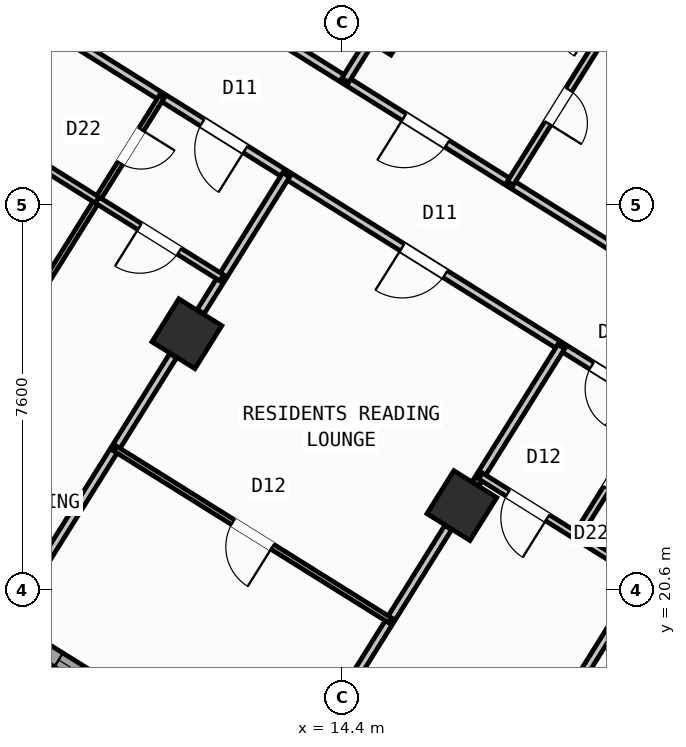
"""IFC4 building model, lengths in metres.
Left out: names, types, materials, properties, quantities, classifications, styles, units other than length and angle.
Written with IfcOpenShell. Run it as: python <this file> out.ifc"""

import sys

from ifc_helpers import new_model, si_unit, direction, frame, frame_2d, origin, origin_2d, place, context, subcontext, project, spatial, rectangle, hollow_rectangle, extrude, source, transform, mapped, element, fill, save


model = new_model("IFC4")
c1 = context("Model", 3, precision=1e-05, world=origin(), true_north=direction((0.0, 1.0)))
c2 = subcontext(c1, "Body", "Model", "MODEL_VIEW")
j1 = project(units=[si_unit("LENGTHUNIT", "METRE"), si_unit("PLANEANGLEUNIT", "RADIAN")], contexts=[c1])
p1 = place(None, origin())
s1 = spatial("IfcSite", under=j1, at=p1, CompositionType="ELEMENT")
p2 = place(p1, origin())
s2 = spatial("IfcBuilding", under=s1, at=p2, CompositionType="ELEMENT")
p3 = place(p2, frame((0.0, 0.0, 49.2)))
s3 = spatial("IfcBuildingStorey", under=s2, at=p3, CompositionType="ELEMENT", Elevation=49.2)
m1 = source(origin(), c2, "Body", "SweptSolid", [
    extrude(hollow_rectangle(XDim=1.0, YDim=1.0, WallThickness=0.04, at=origin_2d()), origin(), (0.0, 0.0, 1.0), 3.6),
])
for number, where, z_axis, x_axis in (
    (1, (16.764, 22.261, 0.0), (0.0, 0.0, 1.0), (-0.848, 0.53, 0.0)),
    (2, (15.205, 31.844, 0.0), (0.0, 0.0, 1.0), (-0.848, 0.53, 0.0)),
    (3, (11.336, 25.653, 0.0), (0.0, 0.0, 1.0), (-0.848, 0.53, 0.0)),
):
    element("IfcColumn", number, at=place(p3, frame(where, z_axis=z_axis, x_axis=x_axis)), inside=s3, PredefinedType="COLUMN", context=c2, shape_type="MappedRepresentation", body=[
        mapped(m1, transform((0.0, 0.0, 0.0), scale=1.0)),
    ])
p4 = place(p3, frame((29.268, 6.429, 0.0), z_axis=(0.0, 0.0, 1.0), x_axis=(-0.848049971435, 0.529916263149, 0.0)))
e4 = element("IfcWall", 4, at=p4, inside=s3, PredefinedType="STANDARD", context=c2, shape_type="SweptSolid", body=[
    extrude(rectangle(XDim=31.588, YDim=0.32, at=frame_2d((15.794, 0.0))), origin(), (0.0, 0.0, 1.0), 3.35),
])
p5 = place(p4, frame((16.362, 0.0, 0.0)))
e5 = element("IfcOpeningElement", 5, at=p5, cuts=e4, PredefinedType="OPENING", context=c2, shape_type="SweptSolid", body=[
    extrude(rectangle(XDim=1.2, YDim=2.15, at=frame_2d((0.6, 1.075))), frame((0.0, 0.17, 0.0), z_axis=(0.0, -1.0, 0.0), x_axis=(1.0, 0.0, 0.0)), (0.0, 0.0, 1.0), 0.34),
])
p6 = place(p4, frame((2.989, 0.0, 0.8)))
e6 = element("IfcOpeningElement", 6, at=p6, cuts=e4, PredefinedType="OPENING", context=c2, shape_type="SweptSolid", body=[
    extrude(rectangle(XDim=2.1, YDim=1.55, at=frame_2d((1.05, 0.775))), frame((0.0, 0.17, 0.0), z_axis=(0.0, -1.0, 0.0), x_axis=(1.0, 0.0, 0.0)), (0.0, 0.0, 1.0), 0.34),
])
p7 = place(p4, frame((8.359, 0.0, 0.8)))
e7 = element("IfcOpeningElement", 7, at=p7, cuts=e4, PredefinedType="OPENING", context=c2, shape_type="SweptSolid", body=[
    extrude(rectangle(XDim=2.1, YDim=1.55, at=frame_2d((1.05, 0.775))), frame((0.0, 0.17, 0.0), z_axis=(0.0, -1.0, 0.0), x_axis=(1.0, 0.0, 0.0)), (0.0, 0.0, 1.0), 0.34),
])
p8 = place(p4, frame((13.284, 0.0, 0.95)))
e8 = element("IfcOpeningElement", 8, at=p8, cuts=e4, PredefinedType="OPENING", context=c2, shape_type="SweptSolid", body=[
    extrude(rectangle(XDim=1.2, YDim=1.4, at=frame_2d((0.6, 0.7))), frame((0.0, 0.17, 0.0), z_axis=(0.0, -1.0, 0.0), x_axis=(1.0, 0.0, 0.0)), (0.0, 0.0, 1.0), 0.34),
])
p9 = place(p4, frame((20.259, 0.0, 0.95)))
e9 = element("IfcOpeningElement", 9, at=p9, cuts=e4, PredefinedType="OPENING", context=c2, shape_type="SweptSolid", body=[
    extrude(rectangle(XDim=1.2, YDim=1.4, at=frame_2d((0.6, 0.7))), frame((0.0, 0.17, 0.0), z_axis=(0.0, -1.0, 0.0), x_axis=(1.0, 0.0, 0.0)), (0.0, 0.0, 1.0), 0.34),
])
p10 = place(p4, frame((22.929, 0.0, 0.95)))
e10 = element("IfcOpeningElement", 10, at=p10, cuts=e4, PredefinedType="OPENING", context=c2, shape_type="SweptSolid", body=[
    extrude(rectangle(XDim=1.2, YDim=1.4, at=frame_2d((0.6, 0.7))), frame((0.0, 0.17, 0.0), z_axis=(0.0, -1.0, 0.0), x_axis=(1.0, 0.0, 0.0)), (0.0, 0.0, 1.0), 0.34),
])
p11 = place(p4, frame((26.106, 0.0, 0.85)))
e11 = element("IfcOpeningElement", 11, at=p11, cuts=e4, PredefinedType="OPENING", context=c2, shape_type="SweptSolid", body=[
    extrude(rectangle(XDim=1.5, YDim=1.5, at=frame_2d((0.75, 0.75))), frame((0.0, 0.17, 0.0), z_axis=(0.0, -1.0, 0.0), x_axis=(1.0, 0.0, 0.0)), (0.0, 0.0, 1.0), 0.34),
])
p12 = place(p4, frame((29.068, 0.0, 0.85)))
e12 = element("IfcOpeningElement", 12, at=p12, cuts=e4, PredefinedType="OPENING", context=c2, shape_type="SweptSolid", body=[
    extrude(rectangle(XDim=1.8, YDim=1.5, at=frame_2d((0.9, 0.75))), frame((0.0, 0.17, 0.0), z_axis=(0.0, -1.0, 0.0), x_axis=(1.0, 0.0, 0.0)), (0.0, 0.0, 1.0), 0.34),
])
p13 = place(p3, frame((2.415, 23.452, 0.0), z_axis=(0.0, 0.0, 1.0), x_axis=(0.52991049553, 0.848053575387, 0.0)))
e13 = element("IfcWall", 13, at=p13, inside=s3, PredefinedType="STANDARD", context=c2, shape_type="SweptSolid", body=[
    extrude(rectangle(XDim=21.587, YDim=0.32, at=frame_2d((10.794, 0.0))), origin(), (0.0, 0.0, 1.0), 2.725),
])
p14 = place(p13, frame((2.356, 0.0, 0.8)))
e14 = element("IfcOpeningElement", 14, at=p14, cuts=e13, PredefinedType="OPENING", context=c2, shape_type="SweptSolid", body=[
    extrude(rectangle(XDim=2.1, YDim=1.55, at=frame_2d((1.05, 0.775))), frame((0.0, 0.17, 0.0), z_axis=(0.0, -1.0, 0.0), x_axis=(1.0, 0.0, 0.0)), (0.0, 0.0, 1.0), 0.34),
])
p15 = place(p13, frame((8.639, 0.0, 1.0)))
e15 = element("IfcOpeningElement", 15, at=p15, cuts=e13, PredefinedType="OPENING", context=c2, shape_type="SweptSolid", body=[
    extrude(rectangle(XDim=0.9, YDim=1.25, at=frame_2d((0.45, 0.625))), frame((0.0, 0.17, 0.0), z_axis=(0.0, -1.0, 0.0), x_axis=(1.0, 0.0, 0.0)), (0.0, 0.0, 1.0), 0.34),
])
p16 = place(p13, frame((17.129, 0.0, 0.85)))
e16 = element("IfcOpeningElement", 16, at=p16, cuts=e13, PredefinedType="OPENING", context=c2, shape_type="SweptSolid", body=[
    extrude(rectangle(XDim=1.5, YDim=1.5, at=frame_2d((0.75, 0.75))), frame((0.0, 0.17, 0.0), z_axis=(0.0, -1.0, 0.0), x_axis=(1.0, 0.0, 0.0)), (0.0, 0.0, 1.0), 0.34),
])
p17 = place(p3, frame((14.138, 41.825, 0.0), z_axis=(0.0, 0.0, 1.0), x_axis=(0.848046498049, -0.529921821731, 0.0)))
e17 = element("IfcWall", 17, at=p17, inside=s3, PredefinedType="STANDARD", context=c2, shape_type="SweptSolid", body=[
    extrude(rectangle(XDim=31.588, YDim=0.32, at=frame_2d((15.794, 0.0))), origin(), (0.0, 0.0, 1.0), 3.35),
])
p18 = place(p17, frame((3.159, 0.0, 0.0)))
e18 = element("IfcOpeningElement", 18, at=p18, cuts=e17, PredefinedType="OPENING", context=c2, shape_type="SweptSolid", body=[
    extrude(rectangle(XDim=1.05, YDim=2.15, at=frame_2d((0.525, 1.075))), frame((0.0, 0.17, 0.0), z_axis=(0.0, -1.0, 0.0), x_axis=(1.0, 0.0, 0.0)), (0.0, 0.0, 1.0), 0.34),
])
p19 = place(p17, frame((0.906, 0.0, 1.0)))
e19 = element("IfcOpeningElement", 19, at=p19, cuts=e17, PredefinedType="OPENING", context=c2, shape_type="SweptSolid", body=[
    extrude(rectangle(XDim=0.9, YDim=1.25, at=frame_2d((0.45, 0.625))), frame((0.0, 0.17, 0.0), z_axis=(0.0, -1.0, 0.0), x_axis=(1.0, 0.0, 0.0)), (0.0, 0.0, 1.0), 0.34),
])
p20 = place(p17, frame((9.537, 0.0, 0.85)))
e20 = element("IfcOpeningElement", 20, at=p20, cuts=e17, PredefinedType="OPENING", context=c2, shape_type="SweptSolid", body=[
    extrude(rectangle(XDim=1.8, YDim=1.5, at=frame_2d((0.9, 0.75))), frame((0.0, 0.17, 0.0), z_axis=(0.0, -1.0, 0.0), x_axis=(1.0, 0.0, 0.0)), (0.0, 0.0, 1.0), 0.34),
])
p21 = place(p17, frame((13.899, 0.0, 0.85)))
e21 = element("IfcOpeningElement", 21, at=p21, cuts=e17, PredefinedType="OPENING", context=c2, shape_type="SweptSolid", body=[
    extrude(rectangle(XDim=1.5, YDim=1.5, at=frame_2d((0.75, 0.75))), frame((0.0, 0.17, 0.0), z_axis=(0.0, -1.0, 0.0), x_axis=(1.0, 0.0, 0.0)), (0.0, 0.0, 1.0), 0.34),
])
p22 = place(p17, frame((22.019, 0.0, 0.95)))
e22 = element("IfcOpeningElement", 22, at=p22, cuts=e17, PredefinedType="OPENING", context=c2, shape_type="SweptSolid", body=[
    extrude(rectangle(XDim=1.2, YDim=1.4, at=frame_2d((0.6, 0.7))), frame((0.0, 0.17, 0.0), z_axis=(0.0, -1.0, 0.0), x_axis=(1.0, 0.0, 0.0)), (0.0, 0.0, 1.0), 0.34),
])
p23 = place(p17, frame((27.569, 0.0, 0.95)))
e23 = element("IfcOpeningElement", 23, at=p23, cuts=e17, PredefinedType="OPENING", context=c2, shape_type="SweptSolid", body=[
    extrude(rectangle(XDim=1.2, YDim=1.4, at=frame_2d((0.6, 0.7))), frame((0.0, 0.17, 0.0), z_axis=(0.0, -1.0, 0.0), x_axis=(1.0, 0.0, 0.0)), (0.0, 0.0, 1.0), 0.34),
])
p24 = place(p3, frame((21.938, 23.391, 0.0), z_axis=(0.0, 0.0, 1.0), x_axis=(-0.529924725692, -0.848044683434, 0.0)))
e24 = element("IfcWall", 24, at=p24, inside=s3, PredefinedType="PARTITIONING", context=c2, shape_type="SweptSolid", body=[
    extrude(rectangle(XDim=10.35, YDim=0.16, at=frame_2d((5.175, 0.0))), origin(), (0.0, 0.0, 1.0), 3.34),
])
p25 = place(p3, frame((23.104, 25.256, 0.0), z_axis=(0.0, 0.0, 1.0), x_axis=(-0.848041752158, 0.529929416617, 0.0)))
e25 = element("IfcWall", 25, at=p25, inside=s3, PredefinedType="PARTITIONING", context=c2, shape_type="SweptSolid", body=[
    extrude(rectangle(XDim=16.73, YDim=0.16, at=frame_2d((8.365, 0.0))), origin(), (0.0, 0.0, 1.0), 3.34),
])
p26 = place(p25, frame((1.395, 0.0, 0.0)))
e26 = element("IfcOpeningElement", 26, at=p26, cuts=e25, PredefinedType="OPENING", context=c2, shape_type="SweptSolid", body=[
    extrude(rectangle(XDim=1.0, YDim=2.1, at=frame_2d((0.5, 1.05))), frame((0.0, 0.09, 0.0), z_axis=(0.0, -1.0, 0.0), x_axis=(1.0, 0.0, 0.0)), (0.0, 0.0, 1.0), 0.18),
])
p27 = place(p25, frame((7.82, 0.0, 0.0)))
e27 = element("IfcOpeningElement", 27, at=p27, cuts=e25, PredefinedType="OPENING", context=c2, shape_type="SweptSolid", body=[
    extrude(rectangle(XDim=1.0, YDim=2.1, at=frame_2d((0.5, 1.05))), frame((0.0, 0.09, 0.0), z_axis=(0.0, -1.0, 0.0), x_axis=(1.0, 0.0, 0.0)), (0.0, 0.0, 1.0), 0.18),
])
p28 = place(p25, frame((14.76, 0.0, 0.0)))
e28 = element("IfcOpeningElement", 28, at=p28, cuts=e25, PredefinedType="OPENING", context=c2, shape_type="SweptSolid", body=[
    extrude(rectangle(XDim=1.0, YDim=2.1, at=frame_2d((0.5, 1.05))), frame((0.0, 0.09, 0.0), z_axis=(0.0, -1.0, 0.0), x_axis=(1.0, 0.0, 0.0)), (0.0, 0.0, 1.0), 0.18),
])
p29 = place(p3, frame((21.938, 23.391, 0.0), z_axis=(0.0, 0.0, 1.0), x_axis=(-0.848045850158, 0.529922858565, 0.0)))
e29 = element("IfcWall", 29, at=p29, inside=s3, PredefinedType="PARTITIONING", context=c2, shape_type="SweptSolid", body=[
    extrude(rectangle(XDim=16.73, YDim=0.16, at=frame_2d((8.365, 0.0))), origin(), (0.0, 0.0, 1.0), 3.34),
])
p30 = place(p29, frame((2.22, 0.0, 0.0)))
e30 = element("IfcOpeningElement", 30, at=p30, cuts=e29, PredefinedType="OPENING", context=c2, shape_type="SweptSolid", body=[
    extrude(rectangle(XDim=0.86, YDim=2.05, at=frame_2d((0.43, 1.025))), frame((0.0, 0.09, 0.0), z_axis=(0.0, -1.0, 0.0), x_axis=(1.0, 0.0, 0.0)), (0.0, 0.0, 1.0), 0.18),
])
p31 = place(p29, frame((6.49, 0.0, 0.0)))
e31 = element("IfcOpeningElement", 31, at=p31, cuts=e29, PredefinedType="OPENING", context=c2, shape_type="SweptSolid", body=[
    extrude(rectangle(XDim=1.0, YDim=2.1, at=frame_2d((0.5, 1.05))), frame((0.0, 0.09, 0.0), z_axis=(0.0, -1.0, 0.0), x_axis=(1.0, 0.0, 0.0)), (0.0, 0.0, 1.0), 0.18),
])
p32 = place(p29, frame((11.14, 0.0, 0.0)))
e32 = element("IfcOpeningElement", 32, at=p32, cuts=e29, PredefinedType="OPENING", context=c2, shape_type="SweptSolid", body=[
    extrude(rectangle(XDim=1.0, YDim=2.1, at=frame_2d((0.5, 1.05))), frame((0.0, 0.09, 0.0), z_axis=(0.0, -1.0, 0.0), x_axis=(1.0, 0.0, 0.0)), (0.0, 0.0, 1.0), 0.18),
])
p33 = place(p3, frame((18.724, 25.399, 0.0), z_axis=(0.0, 0.0, 1.0), x_axis=(-0.529930102756, -0.848041323399, 0.0)))
e33 = element("IfcWall", 33, at=p33, inside=s3, PredefinedType="PARTITIONING", context=c2, shape_type="SweptSolid", body=[
    extrude(rectangle(XDim=3.188, YDim=0.16, at=frame_2d((1.594, 0.0))), origin(), (0.0, 0.0, 1.0), 2.725),
])
p34 = place(p3, frame((16.492, 21.827, 0.0), z_axis=(0.0, 0.0, 1.0), x_axis=(-0.529904608059, -0.848057254175, 0.0)))
e34 = element("IfcWall", 34, at=p34, inside=s3, PredefinedType="PARTITIONING", context=c2, shape_type="SweptSolid", body=[
    extrude(rectangle(XDim=5.351, YDim=0.16, at=frame_2d((2.675, 0.0))), origin(), (0.0, 0.0, 1.0), 2.725),
])
p35 = place(p3, frame((20.343, 20.838, 0.0), z_axis=(0.0, 0.0, 1.0), x_axis=(-0.848059820872, 0.529900500304, 0.0)))
e35 = element("IfcWall", 35, at=p35, inside=s3, PredefinedType="PLUMBINGWALL", context=c2, shape_type="SweptSolid", body=[
    extrude(rectangle(XDim=3.79, YDim=0.14, at=frame_2d((1.895, 0.0))), origin(), (0.0, 0.0, 1.0), 3.34),
])
p36 = place(p35, frame((2.23, 0.0, 0.0)))
e36 = element("IfcOpeningElement", 36, at=p36, cuts=e35, PredefinedType="OPENING", context=c2, shape_type="SweptSolid", body=[
    extrude(rectangle(XDim=0.92, YDim=2.08, at=frame_2d((0.46, 1.04))), frame((0.0, 0.08, 0.0), z_axis=(0.0, -1.0, 0.0), x_axis=(1.0, 0.0, 0.0)), (0.0, 0.0, 1.0), 0.16),
])
p37 = place(p3, frame((20.624, 24.212, 0.0), z_axis=(0.0, 0.0, 1.0), x_axis=(-0.529940615993, -0.848034753722, 0.0)))
e37 = element("IfcWall", 37, at=p37, inside=s3, PredefinedType="PLUMBINGWALL", context=c2, shape_type="SweptSolid", body=[
    extrude(rectangle(XDim=3.01, YDim=0.14, at=frame_2d((1.505, 0.0))), origin(), (0.0, 0.0, 1.0), 2.995),
])
p38 = place(p37, frame((1.115, 0.0, 0.0)))
e38 = element("IfcOpeningElement", 38, at=p38, cuts=e37, PredefinedType="OPENING", context=c2, shape_type="SweptSolid", body=[
    extrude(rectangle(XDim=0.78, YDim=2.05, at=frame_2d((0.39, 1.025))), frame((0.0, 0.08, 0.0), z_axis=(0.0, -1.0, 0.0), x_axis=(1.0, 0.0, 0.0)), (0.0, 0.0, 1.0), 0.16),
])
p39 = place(p3, frame((13.297, 28.791, 0.0), z_axis=(0.0, 0.0, 1.0), x_axis=(-0.529930102756, -0.848041323399, 0.0)))
e39 = element("IfcWall", 39, at=p39, inside=s3, PredefinedType="PARTITIONING", context=c2, shape_type="SweptSolid", body=[
    extrude(rectangle(XDim=3.188, YDim=0.16, at=frame_2d((1.594, 0.0))), origin(), (0.0, 0.0, 1.0), 2.725),
])
p40 = place(p3, frame((11.065, 25.219, 0.0), z_axis=(0.0, 0.0, 1.0), x_axis=(-0.529904608059, -0.848057254175, 0.0)))
e40 = element("IfcWall", 40, at=p40, inside=s3, PredefinedType="PARTITIONING", context=c2, shape_type="SweptSolid", body=[
    extrude(rectangle(XDim=5.351, YDim=0.16, at=frame_2d((2.675, 0.0))), origin(), (0.0, 0.0, 1.0), 2.725),
])
p41 = place(p3, frame((15.348, 19.995, 0.0), z_axis=(0.0, 0.0, 1.0), x_axis=(-0.848056163074, 0.529906354247, 0.0)))
e41 = element("IfcWall", 41, at=p41, inside=s3, PredefinedType="PARTITIONING", context=c2, shape_type="SweptSolid", body=[
    extrude(rectangle(XDim=6.4, YDim=0.11, at=frame_2d((3.2, 0.0))), origin(), (0.0, 0.0, 1.0), 3.34),
])
p42 = place(p41, frame((2.74, 0.0, 0.0)))
e42 = element("IfcOpeningElement", 42, at=p42, cuts=e41, PredefinedType="OPENING", context=c2, shape_type="SweptSolid", body=[
    extrude(rectangle(XDim=0.92, YDim=2.08, at=frame_2d((0.46, 1.04))), frame((0.0, 0.065, 0.0), z_axis=(0.0, -1.0, 0.0), x_axis=(1.0, 0.0, 0.0)), (0.0, 0.0, 1.0), 0.13),
])
p43 = place(p3, frame((10.837, 30.327, 0.0), z_axis=(0.0, 0.0, 1.0), x_axis=(-0.529912148489, -0.848052542525, 0.0)))
e43 = element("IfcWall", 43, at=p43, inside=s3, PredefinedType="PARTITIONING", context=c2, shape_type="SweptSolid", body=[
    extrude(rectangle(XDim=10.62, YDim=0.11, at=frame_2d((5.31, 0.0))), origin(), (0.0, 0.0, 1.0), 3.34),
])
p44 = place(p43, frame((0.76, 0.0, 0.0)))
e44 = element("IfcOpeningElement", 44, at=p44, cuts=e43, PredefinedType="OPENING", context=c2, shape_type="SweptSolid", body=[
    extrude(rectangle(XDim=0.78, YDim=2.05, at=frame_2d((0.39, 1.025))), frame((0.0, 0.065, 0.0), z_axis=(0.0, -1.0, 0.0), x_axis=(1.0, 0.0, 0.0)), (0.0, 0.0, 1.0), 0.13),
])
p45 = place(p43, frame((6.05, 0.0, 0.0)))
e45 = element("IfcOpeningElement", 45, at=p45, cuts=e43, PredefinedType="OPENING", context=c2, shape_type="SweptSolid", body=[
    extrude(rectangle(XDim=0.92, YDim=2.08, at=frame_2d((0.46, 1.04))), frame((0.0, 0.065, 0.0), z_axis=(0.0, -1.0, 0.0), x_axis=(1.0, 0.0, 0.0)), (0.0, 0.0, 1.0), 0.13),
])
p46 = place(p3, frame((12.025, 26.755, 0.0), z_axis=(0.0, 0.0, 1.0), x_axis=(-0.848059786386, 0.529900555496, 0.0)))
e46 = element("IfcWall", 46, at=p46, inside=s3, PredefinedType="PLUMBINGWALL", context=c2, shape_type="SweptSolid", body=[
    extrude(rectangle(XDim=2.9, YDim=0.14, at=frame_2d((1.45, 0.0))), origin(), (0.0, 0.0, 1.0), 3.34),
])
p47 = place(p46, frame((0.99, 0.0, 0.0)))
e47 = element("IfcOpeningElement", 47, at=p47, cuts=e46, PredefinedType="OPENING", context=c2, shape_type="SweptSolid", body=[
    extrude(rectangle(XDim=0.92, YDim=2.08, at=frame_2d((0.46, 1.04))), frame((0.0, 0.08, 0.0), z_axis=(0.0, -1.0, 0.0), x_axis=(1.0, 0.0, 0.0)), (0.0, 0.0, 1.0), 0.16),
])
p48 = place(p3, frame((9.566, 28.292, 0.0), z_axis=(0.0, 0.0, 1.0), x_axis=(-0.848021036626, 0.529962566074, 0.0)))
e48 = element("IfcWall", 48, at=p48, inside=s3, PredefinedType="PLUMBINGWALL", context=c2, shape_type="SweptSolid", body=[
    extrude(rectangle(XDim=3.62, YDim=0.14, at=frame_2d((1.81, 0.0))), origin(), (0.0, 0.0, 1.0), 3.34),
])
p49 = place(p3, frame((14.933, 31.409, 0.0), z_axis=(0.0, 0.0, 1.0), x_axis=(-0.529776512202, -0.848137280821, 0.0)))
e49 = element("IfcWall", 49, at=p49, inside=s3, PredefinedType="PARTITIONING", context=c2, shape_type="SweptSolid", body=[
    extrude(rectangle(XDim=0.888, YDim=0.16, at=frame_2d((0.444, 0.0))), origin(), (0.0, 0.0, 1.0), 2.725),
])
p50 = place(p3, frame((21.787, 30.301, 0.0), z_axis=(0.0, 0.0, 1.0), x_axis=(-0.848049732085, 0.529916646191, 0.0)))
e50 = element("IfcWall", 50, at=p50, inside=s3, PredefinedType="PLUMBINGWALL", context=c2, shape_type="SweptSolid", body=[
    extrude(rectangle(XDim=6.4, YDim=0.14, at=frame_2d((3.2, 0.0))), origin(), (0.0, 0.0, 1.0), 3.34),
])
p51 = place(p50, frame((2.824, 0.0, 0.0)))
e51 = element("IfcOpeningElement", 51, at=p51, cuts=e50, PredefinedType="OPENING", context=c2, shape_type="SweptSolid", body=[
    extrude(rectangle(XDim=0.78, YDim=2.05, at=frame_2d((0.39, 1.025))), frame((0.0, 0.08, 0.0), z_axis=(0.0, -1.0, 0.0), x_axis=(1.0, 0.0, 0.0)), (0.0, 0.0, 1.0), 0.16),
])
p52 = place(p3, frame((19.616, 31.657, 0.0), z_axis=(0.0, 0.0, 1.0), x_axis=(-0.529876336437, -0.84807491891, 0.0)))
e52 = element("IfcWall", 52, at=p52, inside=s3, PredefinedType="PLUMBINGWALL", context=c2, shape_type="SweptSolid", body=[
    extrude(rectangle(XDim=3.58, YDim=0.14, at=frame_2d((1.79, 0.0))), origin(), (0.0, 0.0, 1.0), 3.34),
])
p53 = place(p52, frame((1.4, 0.0, 0.0)))
e53 = element("IfcOpeningElement", 53, at=p53, cuts=e52, PredefinedType="OPENING", context=c2, shape_type="SweptSolid", body=[
    extrude(rectangle(XDim=0.78, YDim=2.05, at=frame_2d((0.39, 1.025))), frame((0.0, 0.08, 0.0), z_axis=(0.0, -1.0, 0.0), x_axis=(1.0, 0.0, 0.0)), (0.0, 0.0, 1.0), 0.16),
])
m2 = source(origin(), c2, "Body", "SweptSolid", [
    extrude(rectangle(XDim=1.2, YDim=1.4, at=frame_2d((0.6, 0.7))), frame((0.0, 0.03, 0.0), z_axis=(0.0, -1.0, 0.0), x_axis=(1.0, 0.0, 0.0)), (0.0, 0.0, 1.0), 0.06),
])
p54 = place(p10, origin())
e54 = element("IfcWindow", 54, at=p54, inside=s3, PartitioningType="SINGLE_PANEL", PredefinedType="WINDOW", context=c2, shape_type="MappedRepresentation", body=[
    mapped(m2, transform((0.0, 0.0, 0.0), scale=1.0)),
])
fill(e10, e54)
m3 = source(origin(), c2, "Body", "SweptSolid", [
    extrude(rectangle(XDim=0.86, YDim=2.05, at=frame_2d((0.43, 1.025))), frame((0.0, 0.025, 0.0), z_axis=(0.0, -1.0, 0.0), x_axis=(1.0, 0.0, 0.0)), (0.0, 0.0, 1.0), 0.05),
])
p55 = place(p30, origin())
e55 = element("IfcDoor", 55, at=p55, inside=s3, OperationType="SINGLE_SWING_LEFT", PredefinedType="DOOR", context=c2, shape_type="MappedRepresentation", body=[
    mapped(m3, transform((0.0, 0.0, 0.0), scale=1.0)),
])
fill(e30, e55)
m4 = source(origin(), c2, "Body", "SweptSolid", [
    extrude(rectangle(XDim=0.92, YDim=2.08, at=frame_2d((0.46, 1.04))), frame((0.0, 0.025, 0.0), z_axis=(0.0, -1.0, 0.0), x_axis=(1.0, 0.0, 0.0)), (0.0, 0.0, 1.0), 0.05),
])
p56 = place(p36, origin())
e56 = element("IfcDoor", 56, at=p56, inside=s3, OperationType="SINGLE_SWING_LEFT", PredefinedType="DOOR", context=c2, shape_type="MappedRepresentation", body=[
    mapped(m4, transform((0.0, 0.0, 0.0), scale=1.0)),
])
fill(e36, e56)
m5 = source(origin(), c2, "Body", "SweptSolid", [
    extrude(rectangle(XDim=0.78, YDim=2.05, at=frame_2d((0.39, 1.025))), frame((0.0, 0.025, 0.0), z_axis=(0.0, -1.0, 0.0), x_axis=(1.0, 0.0, 0.0)), (0.0, 0.0, 1.0), 0.05),
])
p57 = place(p38, origin())
e57 = element("IfcDoor", 57, at=p57, inside=s3, OperationType="SINGLE_SWING_LEFT", PredefinedType="DOOR", context=c2, shape_type="MappedRepresentation", body=[
    mapped(m5, transform((0.0, 0.0, 0.0), scale=1.0)),
])
fill(e38, e57)
m6 = source(origin(), c2, "Body", "SweptSolid", [
    extrude(rectangle(XDim=1.0, YDim=2.1, at=frame_2d((0.5, 1.05))), frame((0.0, 0.025, 0.0), z_axis=(0.0, -1.0, 0.0), x_axis=(1.0, 0.0, 0.0)), (0.0, 0.0, 1.0), 0.05),
])
p58 = place(p31, origin())
e58 = element("IfcDoor", 58, at=p58, inside=s3, OperationType="SINGLE_SWING_RIGHT", PredefinedType="DOOR", context=c2, shape_type="MappedRepresentation", body=[
    mapped(m6, transform((0.0, 0.0, 0.0), scale=1.0)),
])
fill(e31, e58)
p59 = place(p42, origin())
e59 = element("IfcDoor", 59, at=p59, inside=s3, OperationType="SINGLE_SWING_LEFT", PredefinedType="DOOR", context=c2, shape_type="MappedRepresentation", body=[
    mapped(m4, transform((0.0, 0.0, 0.0), scale=1.0)),
])
fill(e42, e59)
p60 = place(p32, origin())
e60 = element("IfcDoor", 60, at=p60, inside=s3, OperationType="SINGLE_SWING_LEFT", PredefinedType="DOOR", context=c2, shape_type="MappedRepresentation", body=[
    mapped(m6, transform((0.0, 0.0, 0.0), scale=1.0)),
])
fill(e32, e60)
p61 = place(p47, origin())
e61 = element("IfcDoor", 61, at=p61, inside=s3, OperationType="SINGLE_SWING_RIGHT", PredefinedType="DOOR", context=c2, shape_type="MappedRepresentation", body=[
    mapped(m4, transform((0.0, 0.0, 0.0), scale=1.0)),
])
fill(e47, e61)
p62 = place(p44, origin())
e62 = element("IfcDoor", 62, at=p62, inside=s3, OperationType="SINGLE_SWING_LEFT", PredefinedType="DOOR", context=c2, shape_type="MappedRepresentation", body=[
    mapped(m5, transform((0.0, 0.0, 0.0), scale=1.0)),
])
fill(e44, e62)
p63 = place(p27, origin())
e63 = element("IfcDoor", 63, at=p63, inside=s3, OperationType="SINGLE_SWING_RIGHT", PredefinedType="DOOR", context=c2, shape_type="MappedRepresentation", body=[
    mapped(m6, transform((0.0, 0.0, 0.0), scale=1.0)),
])
fill(e27, e63)
p64 = place(p53, origin())
e64 = element("IfcDoor", 64, at=p64, inside=s3, OperationType="SINGLE_SWING_RIGHT", PredefinedType="DOOR", context=c2, shape_type="MappedRepresentation", body=[
    mapped(m5, transform((0.0, 0.0, 0.0), scale=1.0)),
])
fill(e53, e64)
save(model, sys.argv[1])
